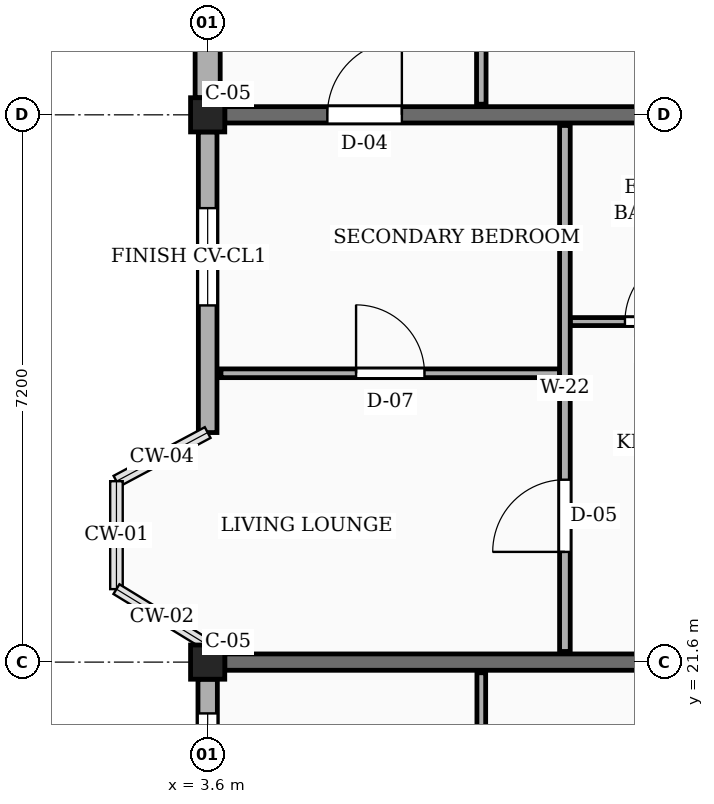
"""IFC4 building model, lengths in metres.
Left out: names, types, materials, properties, quantities, classifications, styles, units other than length and angle.
Written with IfcOpenShell. Run it as: python <this file> out.ifc"""

import sys

from ifc_helpers import new_model, si_unit, direction, frame, frame_2d, origin, origin_2d, place, context, subcontext, project, spatial, rectangle, extrude, element, fill, save


model = new_model("IFC4")
c1 = context("Model", 3, precision=1e-05, world=origin(), true_north=direction((0.0, 1.0)))
c2 = subcontext(c1, "Body", "Model", "MODEL_VIEW")
j1 = project(units=[si_unit("LENGTHUNIT", "METRE"), si_unit("PLANEANGLEUNIT", "RADIAN")], contexts=[c1])
p1 = place(None, origin())
s1 = spatial("IfcSite", under=j1, at=p1, CompositionType="ELEMENT")
p2 = place(p1, origin())
s2 = spatial("IfcBuilding", under=s1, at=p2, CompositionType="ELEMENT")
p3 = place(p2, frame((0.0, 0.0, 36.0)))
s3 = spatial("IfcBuildingStorey", under=s2, at=p3, CompositionType="ELEMENT", Elevation=36.0)
for number, where, z_axis, x_axis in (
    (1, (3.6, 21.6, 0.0), (0.0, 0.0, 1.0), (1.0, 0.0, 0.0)),
    (2, (3.6, 28.8, 0.0), (0.0, 0.0, 1.0), (1.0, 0.0, 0.0)),
):
    element("IfcColumn", number, at=place(p3, frame(where, z_axis=z_axis, x_axis=x_axis)), inside=s3, PredefinedType="COLUMN", context=c2, shape_type="SweptSolid", body=[
        extrude(rectangle(XDim=0.45, YDim=0.45, at=origin_2d()), origin(), (0.0, 0.0, 1.0), 3.15),
    ])
p4 = place(p3, frame((3.825, 21.6, 0.0), z_axis=(0.0, 0.0, 1.0), x_axis=(1.0, 0.0, 0.0)))
e3 = element("IfcWall", 3, at=p4, inside=s3, PredefinedType="SOLIDWALL", context=c2, shape_type="SweptSolid", body=[
    extrude(rectangle(XDim=6.775, YDim=0.215, at=frame_2d((3.388, 0.0))), origin(), (0.0, 0.0, 1.0), 2.17),
])
p5 = place(p3, frame((3.825, 28.8, 0.0), z_axis=(0.0, 0.0, 1.0), x_axis=(1.0, 0.0, 0.0)))
e4 = element("IfcWall", 4, at=p5, inside=s3, PredefinedType="SOLIDWALL", context=c2, shape_type="SweptSolid", body=[
    extrude(rectangle(XDim=6.775, YDim=0.215, at=frame_2d((3.388, 0.0))), origin(), (0.0, 0.0, 1.0), 2.17),
])
p6 = place(p5, frame((1.35, 0.0, 0.0)))
e5 = element("IfcOpeningElement", 5, at=p6, cuts=e4, PredefinedType="OPENING", context=c2, shape_type="SweptSolid", body=[
    extrude(rectangle(XDim=0.98, YDim=2.12, at=frame_2d((0.49, 1.06))), frame((0.0, 0.118, 0.0), z_axis=(0.0, -1.0, 0.0), x_axis=(1.0, 0.0, 0.0)), (0.0, 0.0, 1.0), 0.235),
])
p7 = place(p3, frame((3.6, 35.775, 0.0), z_axis=(0.0, 0.0, 1.0), x_axis=(0.0, -1.0, 0.0)))
e6 = element("IfcWall", 6, at=p7, inside=s3, PredefinedType="SOLIDWALL", context=c2, shape_type="SweptSolid", body=[
    extrude(rectangle(XDim=6.75, YDim=0.33, at=frame_2d((3.375, 0.0))), origin(), (0.0, 0.0, 1.0), 2.44),
])
p8 = place(p7, frame((0.45, 0.0, 0.78)))
e7 = element("IfcOpeningElement", 7, at=p8, cuts=e6, PredefinedType="OPENING", context=c2, shape_type="SweptSolid", body=[
    extrude(rectangle(XDim=1.12, YDim=1.26, at=frame_2d((0.56, 0.63))), frame((0.0, 0.175, 0.0), z_axis=(0.0, -1.0, 0.0), x_axis=(1.0, 0.0, 0.0)), (0.0, 0.0, 1.0), 0.35),
])
p9 = place(p7, frame((4.65, 0.0, 0.78)))
e8 = element("IfcOpeningElement", 8, at=p9, cuts=e6, PredefinedType="OPENING", context=c2, shape_type="SweptSolid", body=[
    extrude(rectangle(XDim=1.28, YDim=1.26, at=frame_2d((0.64, 0.63))), frame((0.0, 0.175, 0.0), z_axis=(0.0, -1.0, 0.0), x_axis=(1.0, 0.0, 0.0)), (0.0, 0.0, 1.0), 0.35),
])
p10 = place(p3, frame((3.6, 28.575, 0.0), z_axis=(0.0, 0.0, 1.0), x_axis=(0.0, -1.0, 0.0)))
e9 = element("IfcWall", 9, at=p10, inside=s3, PredefinedType="SOLIDWALL", context=c2, shape_type="SweptSolid", body=[
    extrude(rectangle(XDim=3.955, YDim=0.245, at=frame_2d((1.978, 0.0))), origin(), (0.0, 0.0, 1.0), 2.44),
])
p11 = place(p10, frame((1.002, 0.0, 0.78)))
e10 = element("IfcOpeningElement", 10, at=p11, cuts=e9, PredefinedType="OPENING", context=c2, shape_type="SweptSolid", body=[
    extrude(rectangle(XDim=1.28, YDim=1.26, at=frame_2d((0.64, 0.63))), frame((0.0, 0.133, 0.0), z_axis=(0.0, -1.0, 0.0), x_axis=(1.0, 0.0, 0.0)), (0.0, 0.0, 1.0), 0.265),
])
p12 = place(p3, frame((3.6, 21.375, 0.0), z_axis=(0.0, 0.0, 1.0), x_axis=(0.0, -1.0, 0.0)))
e11 = element("IfcWall", 11, at=p12, inside=s3, PredefinedType="SOLIDWALL", context=c2, shape_type="SweptSolid", body=[
    extrude(rectangle(XDim=6.75, YDim=0.255, at=frame_2d((3.375, 0.0))), origin(), (0.0, 0.0, 1.0), 2.44),
])
p13 = place(p12, frame((0.45, 0.0, 0.78)))
e12 = element("IfcOpeningElement", 12, at=p13, cuts=e11, PredefinedType="OPENING", context=c2, shape_type="SweptSolid", body=[
    extrude(rectangle(XDim=1.36, YDim=1.26, at=frame_2d((0.68, 0.63))), frame((0.0, 0.137, 0.0), z_axis=(0.0, -1.0, 0.0), x_axis=(1.0, 0.0, 0.0)), (0.0, 0.0, 1.0), 0.275),
])
p14 = place(p12, frame((4.65, 0.0, 0.78)))
e13 = element("IfcOpeningElement", 13, at=p14, cuts=e11, PredefinedType="OPENING", context=c2, shape_type="SweptSolid", body=[
    extrude(rectangle(XDim=0.9, YDim=1.36, at=frame_2d((0.45, 0.68))), frame((0.0, 0.137, 0.0), z_axis=(0.0, -1.0, 0.0), x_axis=(1.0, 0.0, 0.0)), (0.0, 0.0, 1.0), 0.275),
])
p15 = place(p3, frame((7.2, 14.54, 0.0), z_axis=(0.0, 0.0, 1.0), x_axis=(0.0, 1.0, 0.0)))
e14 = element("IfcWall", 14, at=p15, inside=s3, PredefinedType="PARTITIONING", context=c2, shape_type="SweptSolid", body=[
    extrude(rectangle(XDim=6.92, YDim=0.115, at=frame_2d((3.46, 0.0))), origin(), (0.0, 0.0, 1.0), 2.305),
])
p16 = place(p15, frame((1.05, 0.0, 0.0)))
e15 = element("IfcOpeningElement", 15, at=p16, cuts=e14, PredefinedType="OPENING", context=c2, shape_type="SweptSolid", body=[
    extrude(rectangle(XDim=0.87, YDim=2.05, at=frame_2d((0.435, 1.025))), frame((0.0, 0.067, 0.0), z_axis=(0.0, -1.0, 0.0), x_axis=(1.0, 0.0, 0.0)), (0.0, 0.0, 1.0), 0.135),
])
p17 = place(p15, frame((4.45, 0.0, 0.0)))
e16 = element("IfcOpeningElement", 16, at=p17, cuts=e14, PredefinedType="OPENING", context=c2, shape_type="SweptSolid", body=[
    extrude(rectangle(XDim=0.88, YDim=2.08, at=frame_2d((0.44, 1.04))), frame((0.0, 0.067, 0.0), z_axis=(0.0, -1.0, 0.0), x_axis=(1.0, 0.0, 0.0)), (0.0, 0.0, 1.0), 0.135),
])
p18 = place(p3, frame((3.775, 25.4, 0.0), z_axis=(0.0, 0.0, 1.0), x_axis=(1.0, 0.0, 0.0)))
e17 = element("IfcWall", 17, at=p18, inside=s3, PredefinedType="PARTITIONING", context=c2, shape_type="SweptSolid", body=[
    extrude(rectangle(XDim=4.455, YDim=0.115, at=frame_2d((2.228, 0.0))), origin(), (0.0, 0.0, 1.0), 2.305),
])
p19 = place(p18, frame((1.778, 0.0, 0.0)))
e18 = element("IfcOpeningElement", 18, at=p19, cuts=e17, PredefinedType="OPENING", context=c2, shape_type="SweptSolid", body=[
    extrude(rectangle(XDim=0.9, YDim=2.1, at=frame_2d((0.45, 1.05))), frame((0.0, 0.067, 0.0), z_axis=(0.0, -1.0, 0.0), x_axis=(1.0, 0.0, 0.0)), (0.0, 0.0, 1.0), 0.135),
])
p20 = place(p3, frame((8.37, 26.08, 0.0), z_axis=(0.0, 0.0, 1.0), x_axis=(1.0, 0.0, 0.0)))
e19 = element("IfcWall", 19, at=p20, inside=s3, PredefinedType="PARTITIONING", context=c2, shape_type="SweptSolid", body=[
    extrude(rectangle(XDim=2.34, YDim=0.105, at=frame_2d((1.17, 0.0))), origin(), (0.0, 0.0, 1.0), 2.305),
])
p21 = place(p20, frame((0.72, 0.0, 0.0)))
e20 = element("IfcOpeningElement", 20, at=p21, cuts=e19, PredefinedType="OPENING", context=c2, shape_type="SweptSolid", body=[
    extrude(rectangle(XDim=0.9, YDim=2.05, at=frame_2d((0.45, 1.025))), frame((0.0, 0.062, 0.0), z_axis=(0.0, -1.0, 0.0), x_axis=(1.0, 0.0, 0.0)), (0.0, 0.0, 1.0), 0.125),
])
p22 = place(p3, frame((8.3, 21.74, 0.0), z_axis=(0.0, 0.0, 1.0), x_axis=(0.0, 1.0, 0.0)))
e21 = element("IfcWall", 21, at=p22, inside=s3, PredefinedType="PARTITIONING", context=c2, shape_type="SweptSolid", body=[
    extrude(rectangle(XDim=6.92, YDim=0.14, at=frame_2d((3.46, 0.0))), origin(), (0.0, 0.0, 1.0), 2.305),
])
p23 = place(p22, frame((1.31, 0.0, 0.0)))
e22 = element("IfcOpeningElement", 22, at=p23, cuts=e21, PredefinedType="OPENING", context=c2, shape_type="SweptSolid", body=[
    extrude(rectangle(XDim=0.95, YDim=2.1, at=frame_2d((0.475, 1.05))), frame((0.0, 0.08, 0.0), z_axis=(0.0, -1.0, 0.0), x_axis=(1.0, 0.0, 0.0)), (0.0, 0.0, 1.0), 0.16),
])
p24 = place(p3, frame((7.2, 28.94, 0.0), z_axis=(0.0, 0.0, 1.0), x_axis=(0.0, 1.0, 0.0)))
e23 = element("IfcWall", 23, at=p24, inside=s3, PredefinedType="PARTITIONING", context=c2, shape_type="SweptSolid", body=[
    extrude(rectangle(XDim=6.92, YDim=0.125, at=frame_2d((3.46, 0.0))), origin(), (0.0, 0.0, 1.0), 2.305),
])
p25 = place(p24, frame((1.05, 0.0, 0.0)))
e24 = element("IfcOpeningElement", 24, at=p25, cuts=e23, PredefinedType="OPENING", context=c2, shape_type="SweptSolid", body=[
    extrude(rectangle(XDim=0.87, YDim=2.05, at=frame_2d((0.435, 1.025))), frame((0.0, 0.073, 0.0), z_axis=(0.0, -1.0, 0.0), x_axis=(1.0, 0.0, 0.0)), (0.0, 0.0, 1.0), 0.145),
])
p26 = place(p24, frame((4.45, 0.0, 0.0)))
e25 = element("IfcOpeningElement", 25, at=p26, cuts=e23, PredefinedType="OPENING", context=c2, shape_type="SweptSolid", body=[
    extrude(rectangle(XDim=0.88, YDim=2.08, at=frame_2d((0.44, 1.04))), frame((0.0, 0.073, 0.0), z_axis=(0.0, -1.0, 0.0), x_axis=(1.0, 0.0, 0.0)), (0.0, 0.0, 1.0), 0.145),
])
p27 = place(p11, origin())
e26 = element("IfcWindow", 26, at=p27, inside=s3, PartitioningType="SINGLE_PANEL", PredefinedType="WINDOW", context=c2, shape_type="SweptSolid", body=[
    extrude(rectangle(XDim=1.28, YDim=1.26, at=frame_2d((0.64, 0.63))), frame((0.0, 0.03, 0.0), z_axis=(0.0, -1.0, 0.0), x_axis=(1.0, 0.0, 0.0)), (0.0, 0.0, 1.0), 0.06),
])
fill(e10, e26)
p28 = place(p13, origin())
e27 = element("IfcWindow", 27, at=p28, inside=s3, PartitioningType="SINGLE_PANEL", PredefinedType="WINDOW", context=c2, shape_type="SweptSolid", body=[
    extrude(rectangle(XDim=1.36, YDim=1.26, at=frame_2d((0.68, 0.63))), frame((0.0, 0.03, 0.0), z_axis=(0.0, -1.0, 0.0), x_axis=(1.0, 0.0, 0.0)), (0.0, 0.0, 1.0), 0.06),
])
fill(e12, e27)
p29 = place(p19, origin())
e28 = element("IfcDoor", 28, at=p29, inside=s3, OperationType="SINGLE_SWING_LEFT", PredefinedType="DOOR", context=c2, shape_type="SweptSolid", body=[
    extrude(rectangle(XDim=0.9, YDim=2.1, at=frame_2d((0.45, 1.05))), frame((0.0, 0.025, 0.0), z_axis=(0.0, -1.0, 0.0), x_axis=(1.0, 0.0, 0.0)), (0.0, 0.0, 1.0), 0.05),
])
fill(e18, e28)
p30 = place(p21, origin())
e29 = element("IfcDoor", 29, at=p30, inside=s3, OperationType="SINGLE_SWING_RIGHT", PredefinedType="DOOR", context=c2, shape_type="SweptSolid", body=[
    extrude(rectangle(XDim=0.9, YDim=2.05, at=frame_2d((0.45, 1.025))), frame((0.0, 0.025, 0.0), z_axis=(0.0, -1.0, 0.0), x_axis=(1.0, 0.0, 0.0)), (0.0, 0.0, 1.0), 0.05),
])
fill(e20, e29)
p31 = place(p23, origin())
e30 = element("IfcDoor", 30, at=p31, inside=s3, OperationType="SINGLE_SWING_LEFT", PredefinedType="DOOR", context=c2, shape_type="SweptSolid", body=[
    extrude(rectangle(XDim=0.95, YDim=2.1, at=frame_2d((0.475, 1.05))), frame((0.0, 0.025, 0.0), z_axis=(0.0, -1.0, 0.0), x_axis=(1.0, 0.0, 0.0)), (0.0, 0.0, 1.0), 0.05),
])
fill(e22, e30)
p32 = place(p6, origin())
e31 = element("IfcDoor", 31, at=p32, inside=s3, OperationType="SINGLE_SWING_RIGHT", PredefinedType="DOOR", context=c2, shape_type="SweptSolid", body=[
    extrude(rectangle(XDim=0.98, YDim=2.12, at=frame_2d((0.49, 1.06))), frame((0.0, 0.025, 0.0), z_axis=(0.0, -1.0, 0.0), x_axis=(1.0, 0.0, 0.0)), (0.0, 0.0, 1.0), 0.05),
])
fill(e5, e31)
save(model, sys.argv[1])
